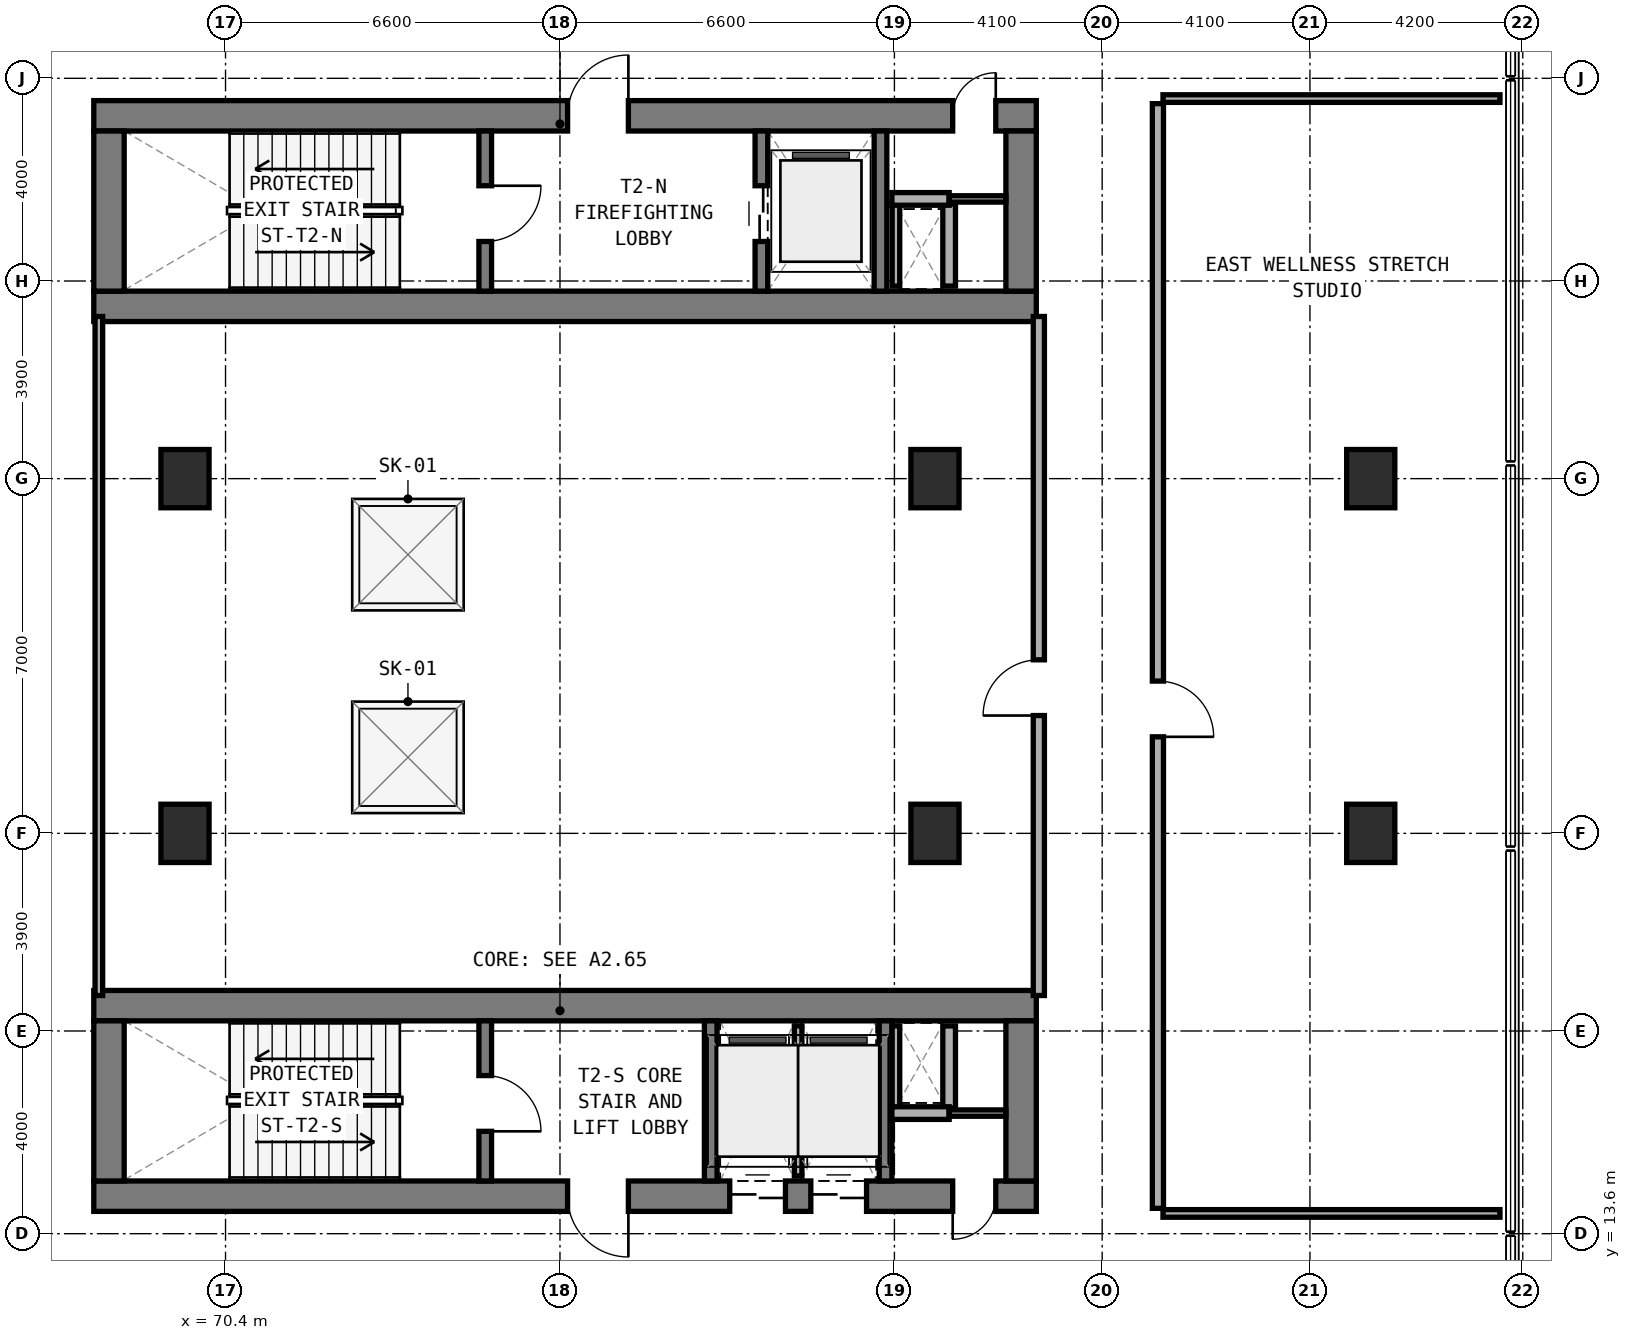
"""IFC4 building model, lengths in metres.
Left out: names, types, materials, properties, quantities, classifications, styles, units other than length and angle.
Written with IfcOpenShell. Run it as: python <this file> out.ifc"""

import sys

from ifc_helpers import new_model, si_unit, direction, frame, frame_2d, origin, origin_2d, place, context, subcontext, project, spatial, rectangle, extrude, element, fill, save


model = new_model("IFC4")
c1 = context("Model", 3, precision=1e-05, world=origin(), true_north=direction((0.0, 1.0)))
c2 = subcontext(c1, "Body", "Model", "MODEL_VIEW")
j1 = project(units=[si_unit("LENGTHUNIT", "METRE"), si_unit("PLANEANGLEUNIT", "RADIAN")], contexts=[c1])
p1 = place(None, origin())
s1 = spatial("IfcSite", under=j1, at=p1, CompositionType="ELEMENT")
p2 = place(p1, origin())
s2 = spatial("IfcBuilding", under=s1, at=p2, CompositionType="ELEMENT")
p3 = place(p2, frame((0.0, 0.0, 19.5)))
s3 = spatial("IfcBuildingStorey", under=s2, at=p3, CompositionType="ELEMENT", Elevation=19.5)
p4 = place(p3, frame((67.8, 31.9, 0.0), z_axis=(0.0, 0.0, 1.0), x_axis=(1.0, 0.0, 0.0)))
e1 = element("IfcWall", 1, at=p4, inside=s3, PredefinedType="SHEAR", context=c2, shape_type="SweptSolid", body=[
    extrude(rectangle(XDim=18.6, YDim=0.6, at=frame_2d((9.3, 0.0))), origin(), (0.0, 0.0, 1.0), 4.5),
])
p5 = place(p3, frame((67.8, 35.66, 0.0), z_axis=(0.0, 0.0, 1.0), x_axis=(1.0, 0.0, 0.0)))
e2 = element("IfcWall", 2, at=p5, inside=s3, PredefinedType="SHEAR", context=c2, shape_type="SweptSolid", body=[
    extrude(rectangle(XDim=18.6, YDim=0.6, at=frame_2d((9.3, 0.0))), origin(), (0.0, 0.0, 1.0), 4.5),
])
p6 = place(p5, frame((9.35, 0.0, 0.0)))
e3 = element("IfcOpeningElement", 3, at=p6, cuts=e2, PredefinedType="OPENING", context=c2, shape_type="SweptSolid", body=[
    extrude(rectangle(XDim=1.2, YDim=2.15, at=frame_2d((0.6, 1.075))), frame((0.0, 0.31, 0.0), z_axis=(0.0, -1.0, 0.0), x_axis=(1.0, 0.0, 0.0)), (0.0, 0.0, 1.0), 0.62),
])
p7 = place(p5, frame((16.95, 0.0, 0.0)))
e4 = element("IfcOpeningElement", 4, at=p7, cuts=e2, PredefinedType="OPENING", context=c2, shape_type="SweptSolid", body=[
    extrude(rectangle(XDim=0.85, YDim=2.1, at=frame_2d((0.425, 1.05))), frame((0.0, 0.31, 0.0), z_axis=(0.0, -1.0, 0.0), x_axis=(1.0, 0.0, 0.0)), (0.0, 0.0, 1.0), 0.62),
])
for number, where, z_axis, x_axis in (
    (5, (68.1, 32.2, 0.0), (0.0, 0.0, 1.0), (0.0, 1.0, 0.0)),
    (6, (86.1, 32.2, 0.0), (0.0, 0.0, 1.0), (0.0, 1.0, 0.0)),
):
    element("IfcWall", number, at=place(p3, frame(where, z_axis=z_axis, x_axis=x_axis)), inside=s3, PredefinedType="SHEAR", context=c2, shape_type="SweptSolid", body=[
        extrude(rectangle(XDim=3.16, YDim=0.6, at=frame_2d((1.58, 0.0))), origin(), (0.0, 0.0, 1.0), 4.5),
    ])
p8 = place(p3, frame((75.525, 32.2, 0.0), z_axis=(0.0, 0.0, 1.0), x_axis=(0.0, 1.0, 0.0)))
e7 = element("IfcWall", 7, at=p8, inside=s3, PredefinedType="STANDARD", context=c2, shape_type="SweptSolid", body=[
    extrude(rectangle(XDim=3.16, YDim=0.25, at=frame_2d((1.58, 0.0))), origin(), (0.0, 0.0, 1.0), 4.25),
])
p9 = place(p8, frame((0.98, 0.0, 0.0)))
e8 = element("IfcOpeningElement", 8, at=p9, cuts=e7, PredefinedType="OPENING", context=c2, shape_type="SweptSolid", body=[
    extrude(rectangle(XDim=1.1, YDim=2.15, at=frame_2d((0.55, 1.075))), frame((0.0, 0.135, 0.0), z_axis=(0.0, -1.0, 0.0), x_axis=(1.0, 0.0, 0.0)), (0.0, 0.0, 1.0), 0.27),
])
p10 = place(p3, frame((80.975, 32.2, 0.0), z_axis=(0.0, 0.0, 1.0), x_axis=(0.0, 1.0, 0.0)))
e9 = element("IfcWall", 9, at=p10, inside=s3, PredefinedType="STANDARD", context=c2, shape_type="SweptSolid", body=[
    extrude(rectangle(XDim=3.16, YDim=0.25, at=frame_2d((1.58, 0.0))), origin(), (0.0, 0.0, 1.0), 4.25),
])
p11 = place(p10, frame((0.98, 0.0, 0.0)))
e10 = element("IfcOpeningElement", 10, at=p11, cuts=e9, PredefinedType="OPENING", context=c2, shape_type="SweptSolid", body=[
    extrude(rectangle(XDim=1.1, YDim=2.15, at=frame_2d((0.55, 1.075))), frame((0.0, 0.135, 0.0), z_axis=(0.0, -1.0, 0.0), x_axis=(1.0, 0.0, 0.0)), (0.0, 0.0, 1.0), 0.27),
])
p12 = place(p3, frame((83.325, 32.2, 0.0), z_axis=(0.0, 0.0, 1.0), x_axis=(0.0, 1.0, 0.0)))
e11 = element("IfcWall", 11, at=p12, inside=s3, PredefinedType="STANDARD", context=c2, shape_type="SweptSolid", body=[
    extrude(rectangle(XDim=3.16, YDim=0.25, at=frame_2d((1.58, 0.0))), origin(), (0.0, 0.0, 1.0), 4.25),
])
p13 = place(p3, frame((67.8, 14.34, 0.0), z_axis=(0.0, 0.0, 1.0), x_axis=(1.0, 0.0, 0.0)))
e12 = element("IfcWall", 12, at=p13, inside=s3, PredefinedType="SHEAR", context=c2, shape_type="SweptSolid", body=[
    extrude(rectangle(XDim=18.6, YDim=0.6, at=frame_2d((9.3, 0.0))), origin(), (0.0, 0.0, 1.0), 4.5),
])
p14 = place(p13, frame((9.35, 0.0, 0.0)))
e13 = element("IfcOpeningElement", 13, at=p14, cuts=e12, PredefinedType="OPENING", context=c2, shape_type="SweptSolid", body=[
    extrude(rectangle(XDim=1.2, YDim=2.15, at=frame_2d((0.6, 1.075))), frame((0.0, 0.31, 0.0), z_axis=(0.0, -1.0, 0.0), x_axis=(1.0, 0.0, 0.0)), (0.0, 0.0, 1.0), 0.62),
])
p15 = place(p13, frame((16.95, 0.0, 0.0)))
e14 = element("IfcOpeningElement", 14, at=p15, cuts=e12, PredefinedType="OPENING", context=c2, shape_type="SweptSolid", body=[
    extrude(rectangle(XDim=0.85, YDim=2.1, at=frame_2d((0.425, 1.05))), frame((0.0, 0.31, 0.0), z_axis=(0.0, -1.0, 0.0), x_axis=(1.0, 0.0, 0.0)), (0.0, 0.0, 1.0), 0.62),
])
p16 = place(p13, frame((12.55, 0.0, 0.0)))
e15 = element("IfcOpeningElement", 15, at=p16, cuts=e12, PredefinedType="OPENING", context=c2, shape_type="SweptSolid", body=[
    extrude(rectangle(XDim=1.1, YDim=2.15, at=frame_2d((0.55, 1.075))), frame((0.0, 0.31, 0.0), z_axis=(0.0, -1.0, 0.0), x_axis=(1.0, 0.0, 0.0)), (0.0, 0.0, 1.0), 0.62),
])
p17 = place(p13, frame((14.15, 0.0, 0.0)))
e16 = element("IfcOpeningElement", 16, at=p17, cuts=e12, PredefinedType="OPENING", context=c2, shape_type="SweptSolid", body=[
    extrude(rectangle(XDim=1.1, YDim=2.15, at=frame_2d((0.55, 1.075))), frame((0.0, 0.31, 0.0), z_axis=(0.0, -1.0, 0.0), x_axis=(1.0, 0.0, 0.0)), (0.0, 0.0, 1.0), 0.62),
])
p18 = place(p3, frame((67.8, 18.1, 0.0), z_axis=(0.0, 0.0, 1.0), x_axis=(1.0, 0.0, 0.0)))
e17 = element("IfcWall", 17, at=p18, inside=s3, PredefinedType="SHEAR", context=c2, shape_type="SweptSolid", body=[
    extrude(rectangle(XDim=18.6, YDim=0.6, at=frame_2d((9.3, 0.0))), origin(), (0.0, 0.0, 1.0), 4.5),
])
for number, where, z_axis, x_axis in (
    (18, (68.1, 14.64, 0.0), (0.0, 0.0, 1.0), (0.0, 1.0, 0.0)),
    (19, (86.1, 14.64, 0.0), (0.0, 0.0, 1.0), (0.0, 1.0, 0.0)),
):
    element("IfcWall", number, at=place(p3, frame(where, z_axis=z_axis, x_axis=x_axis)), inside=s3, PredefinedType="SHEAR", context=c2, shape_type="SweptSolid", body=[
        extrude(rectangle(XDim=3.16, YDim=0.6, at=frame_2d((1.58, 0.0))), origin(), (0.0, 0.0, 1.0), 4.5),
    ])
p19 = place(p3, frame((75.525, 14.64, 0.0), z_axis=(0.0, 0.0, 1.0), x_axis=(0.0, 1.0, 0.0)))
e20 = element("IfcWall", 20, at=p19, inside=s3, PredefinedType="STANDARD", context=c2, shape_type="SweptSolid", body=[
    extrude(rectangle(XDim=3.16, YDim=0.25, at=frame_2d((1.58, 0.0))), origin(), (0.0, 0.0, 1.0), 4.25),
])
p20 = place(p19, frame((0.98, 0.0, 0.0)))
e21 = element("IfcOpeningElement", 21, at=p20, cuts=e20, PredefinedType="OPENING", context=c2, shape_type="SweptSolid", body=[
    extrude(rectangle(XDim=1.1, YDim=2.15, at=frame_2d((0.55, 1.075))), frame((0.0, 0.135, 0.0), z_axis=(0.0, -1.0, 0.0), x_axis=(1.0, 0.0, 0.0)), (0.0, 0.0, 1.0), 0.27),
])
for number, where, z_axis, x_axis in (
    (22, (79.975, 14.64, 0.0), (0.0, 0.0, 1.0), (0.0, 1.0, 0.0)),
    (23, (83.425, 14.64, 0.0), (0.0, 0.0, 1.0), (0.0, 1.0, 0.0)),
):
    element("IfcWall", number, at=place(p3, frame(where, z_axis=z_axis, x_axis=x_axis)), inside=s3, PredefinedType="STANDARD", context=c2, shape_type="SweptSolid", body=[
        extrude(rectangle(XDim=3.16, YDim=0.25, at=frame_2d((1.58, 0.0))), origin(), (0.0, 0.0, 1.0), 4.25),
    ])
for number, where, z_axis, x_axis in (
    (24, (93.0, 21.5, 0.0), (0.0, 0.0, 1.0), (1.0, 0.0, 0.0)),
    (25, (93.0, 28.5, 0.0), (0.0, 0.0, 1.0), (1.0, 0.0, 0.0)),
    (26, (69.6, 21.5, 0.0), (0.0, 0.0, 1.0), (1.0, 0.0, 0.0)),
    (27, (69.6, 28.5, 0.0), (0.0, 0.0, 1.0), (1.0, 0.0, 0.0)),
    (28, (84.4, 21.5, 0.0), (0.0, 0.0, 1.0), (1.0, 0.0, 0.0)),
    (29, (84.4, 28.5, 0.0), (0.0, 0.0, 1.0), (1.0, 0.0, 0.0)),
):
    element("IfcColumn", number, at=place(p3, frame(where, z_axis=z_axis, x_axis=x_axis)), inside=s3, PredefinedType="COLUMN", context=c2, shape_type="SweptSolid", body=[
        extrude(rectangle(XDim=0.95, YDim=1.15, at=origin_2d()), origin(), (0.0, 0.0, 1.0), 4.5),
    ])
p21 = place(p3, frame((83.63, 32.3, 0.0), z_axis=(0.0, 0.0, 1.0), x_axis=(0.0, 1.0, 0.0)))
e30 = element("IfcWall", 30, at=p21, inside=s3, PredefinedType="PARTITIONING", context=c2, shape_type="SweptSolid", body=[
    extrude(rectangle(XDim=1.62, YDim=0.15, at=frame_2d((0.81, 0.0))), origin(), (0.0, 0.0, 1.0), 3.725),
])
p22 = place(p3, frame((84.68, 32.3, 0.0), z_axis=(0.0, 0.0, 1.0), x_axis=(0.0, 1.0, 0.0)))
e31 = element("IfcWall", 31, at=p22, inside=s3, PredefinedType="SOLIDWALL", context=c2, shape_type="SweptSolid", body=[
    extrude(rectangle(XDim=1.62, YDim=0.25, at=frame_2d((0.81, 0.0))), origin(), (0.0, 0.0, 1.0), 4.22),
])
p23 = place(p3, frame((83.55, 34.02, 0.0), z_axis=(0.0, 0.0, 1.0), x_axis=(1.0, 0.0, 0.0)))
e32 = element("IfcWall", 32, at=p23, inside=s3, PredefinedType="SOLIDWALL", context=c2, shape_type="SweptSolid", body=[
    extrude(rectangle(XDim=1.13, YDim=0.25, at=frame_2d((0.565, 0.0))), origin(), (0.0, 0.0, 1.0), 4.22),
])
p24 = place(p3, frame((84.68, 34.02, 0.0), z_axis=(0.0, 0.0, 1.0), x_axis=(1.0, 0.0, 0.0)))
e33 = element("IfcWall", 33, at=p24, inside=s3, PredefinedType="PARTITIONING", context=c2, shape_type="SweptSolid", body=[
    extrude(rectangle(XDim=1.12, YDim=0.125, at=frame_2d((0.56, 0.0))), origin(), (0.0, 0.0, 1.0), 4.22),
])
p25 = place(p3, frame((83.63, 16.08, 0.0), z_axis=(0.0, 0.0, 1.0), x_axis=(0.0, 1.0, 0.0)))
e34 = element("IfcWall", 34, at=p25, inside=s3, PredefinedType="PARTITIONING", context=c2, shape_type="SweptSolid", body=[
    extrude(rectangle(XDim=1.62, YDim=0.15, at=frame_2d((0.81, 0.0))), origin(), (0.0, 0.0, 1.0), 3.725),
])
p26 = place(p3, frame((84.68, 16.08, 0.0), z_axis=(0.0, 0.0, 1.0), x_axis=(0.0, 1.0, 0.0)))
e35 = element("IfcWall", 35, at=p26, inside=s3, PredefinedType="SOLIDWALL", context=c2, shape_type="SweptSolid", body=[
    extrude(rectangle(XDim=1.62, YDim=0.25, at=frame_2d((0.81, 0.0))), origin(), (0.0, 0.0, 1.0), 4.22),
])
p27 = place(p3, frame((83.55, 15.98, 0.0), z_axis=(0.0, 0.0, 1.0), x_axis=(1.0, 0.0, 0.0)))
e36 = element("IfcWall", 36, at=p27, inside=s3, PredefinedType="SOLIDWALL", context=c2, shape_type="SweptSolid", body=[
    extrude(rectangle(XDim=1.13, YDim=0.25, at=frame_2d((0.565, 0.0))), origin(), (0.0, 0.0, 1.0), 4.22),
])
p28 = place(p3, frame((84.68, 15.98, 0.0), z_axis=(0.0, 0.0, 1.0), x_axis=(1.0, 0.0, 0.0)))
e37 = element("IfcWall", 37, at=p28, inside=s3, PredefinedType="PARTITIONING", context=c2, shape_type="SweptSolid", body=[
    extrude(rectangle(XDim=1.12, YDim=0.125, at=frame_2d((0.56, 0.0))), origin(), (0.0, 0.0, 1.0), 4.22),
])
p29 = place(p3, frame((81.7, 14.74, 0.0), z_axis=(0.0, 0.0, 1.0), x_axis=(0.0, 1.0, 0.0)))
e38 = element("IfcWall", 38, at=p29, inside=s3, PredefinedType="PARTITIONING", context=c2, shape_type="SweptSolid", body=[
    extrude(rectangle(XDim=2.96, YDim=0.15, at=frame_2d((1.48, 0.0))), origin(), (0.0, 0.0, 1.0), 4.22),
])
p30 = place(p3, frame((67.9, 18.3, 0.0), z_axis=(0.0, 0.0, 1.0), x_axis=(0.0, 1.0, 0.0)))
e39 = element("IfcWall", 39, at=p30, inside=s3, PredefinedType="PARTITIONING", context=c2, shape_type="SweptSolid", body=[
    extrude(rectangle(XDim=13.4, YDim=0.15, at=frame_2d((6.7, 0.0))), origin(), (0.0, 0.0, 1.0), 3.725),
])
p31 = place(p3, frame((86.45, 18.3, 0.0), z_axis=(0.0, 0.0, 1.0), x_axis=(0.0, 1.0, 0.0)))
e40 = element("IfcWall", 40, at=p31, inside=s3, PredefinedType="SOLIDWALL", context=c2, shape_type="SweptSolid", body=[
    extrude(rectangle(XDim=13.4, YDim=0.22, at=frame_2d((6.7, 0.0))), origin(), (0.0, 0.0, 1.0), 3.725),
])
p32 = place(p31, frame((5.525, 0.0, 0.0)))
e41 = element("IfcOpeningElement", 41, at=p32, cuts=e40, PredefinedType="OPENING", context=c2, shape_type="SweptSolid", body=[
    extrude(rectangle(XDim=1.1, YDim=2.1, at=frame_2d((0.55, 1.05))), frame((0.0, 0.12, 0.0), z_axis=(0.0, -1.0, 0.0), x_axis=(1.0, 0.0, 0.0)), (0.0, 0.0, 1.0), 0.24),
])
for number, where, z_axis, x_axis in (
    (42, (88.9, 14.0, 0.0), (0.0, 0.0, 1.0), (1.0, 0.0, 0.0)),
    (43, (88.9, 36.0, 0.0), (0.0, 0.0, 1.0), (1.0, 0.0, 0.0)),
):
    element("IfcWall", number, at=place(p3, frame(where, z_axis=z_axis, x_axis=x_axis)), inside=s3, PredefinedType="PARTITIONING", context=c2, shape_type="SweptSolid", body=[
        extrude(rectangle(XDim=6.65, YDim=0.15, at=frame_2d((3.325, 0.0))), origin(), (0.0, 0.0, 1.0), 3.865),
    ])
p33 = place(p3, frame((88.8, 14.1, 0.0), z_axis=(0.0, 0.0, 1.0), x_axis=(0.0, 1.0, 0.0)))
e44 = element("IfcWall", 44, at=p33, inside=s3, PredefinedType="SOLIDWALL", context=c2, shape_type="SweptSolid", body=[
    extrude(rectangle(XDim=21.8, YDim=0.22, at=frame_2d((10.9, 0.0))), origin(), (0.0, 0.0, 1.0), 3.725),
])
p34 = place(p33, frame((9.305, 0.0, 0.0)))
e45 = element("IfcOpeningElement", 45, at=p34, cuts=e44, PredefinedType="OPENING", context=c2, shape_type="SweptSolid", body=[
    extrude(rectangle(XDim=1.1, YDim=2.1, at=frame_2d((0.55, 1.05))), frame((0.0, 0.12, 0.0), z_axis=(0.0, -1.0, 0.0), x_axis=(1.0, 0.0, 0.0)), (0.0, 0.0, 1.0), 0.24),
])
p35 = place(p3, frame((0.0, 0.0, -0.4)))
p36 = place(p35, frame((74.0, 23.0, 0.0)))
p37 = place(p36, frame((0.0, 0.0, 0.35)))
e46 = element("IfcWindow", 46, at=p37, inside=s3, PartitioningType="SINGLE_PANEL", PredefinedType="SKYLIGHT", context=c2, shape_type="SweptSolid", body=[
    extrude(rectangle(XDim=2.2, YDim=2.2, at=origin_2d()), origin(), (0.0, 0.0, 1.0), 0.05),
])
p38 = place(p35, frame((74.0, 27.0, 0.0)))
p39 = place(p38, frame((0.0, 0.0, 0.35)))
e47 = element("IfcWindow", 47, at=p39, inside=s3, PartitioningType="SINGLE_PANEL", PredefinedType="SKYLIGHT", context=c2, shape_type="SweptSolid", body=[
    extrude(rectangle(XDim=2.2, YDim=2.2, at=origin_2d()), origin(), (0.0, 0.0, 1.0), 0.05),
])
p40 = place(p9, frame((1.1, 0.0, 0.0), z_axis=(0.0, 0.0, 1.0), x_axis=(-1.0, 0.0, 0.0)))
e48 = element("IfcDoor", 48, at=p40, inside=s3, OperationType="SINGLE_SWING_LEFT", PredefinedType="DOOR", context=c2, shape_type="SweptSolid", body=[
    extrude(rectangle(XDim=1.1, YDim=2.15, at=frame_2d((0.55, 1.075))), frame((0.0, 0.025, 0.0), z_axis=(0.0, -1.0, 0.0), x_axis=(1.0, 0.0, 0.0)), (0.0, 0.0, 1.0), 0.05),
])
fill(e8, e48)
p41 = place(p6, origin())
e49 = element("IfcDoor", 49, at=p41, inside=s3, OperationType="SINGLE_SWING_RIGHT", PredefinedType="DOOR", context=c2, shape_type="SweptSolid", body=[
    extrude(rectangle(XDim=1.2, YDim=2.15, at=frame_2d((0.6, 1.075))), frame((0.0, 0.025, 0.0), z_axis=(0.0, -1.0, 0.0), x_axis=(1.0, 0.0, 0.0)), (0.0, 0.0, 1.0), 0.05),
])
fill(e3, e49)
p42 = place(p11, origin())
e50 = element("IfcDoor", 50, at=p42, inside=s3, OperationType="DOUBLE_DOOR_SLIDING", PredefinedType="DOOR", context=c2, shape_type="SweptSolid", body=[
    extrude(rectangle(XDim=1.1, YDim=2.15, at=frame_2d((0.55, 1.075))), frame((0.0, 0.025, 0.0), z_axis=(0.0, -1.0, 0.0), x_axis=(1.0, 0.0, 0.0)), (0.0, 0.0, 1.0), 0.05),
])
fill(e10, e50)
p43 = place(p7, origin())
e51 = element("IfcDoor", 51, at=p43, inside=s3, OperationType="SINGLE_SWING_RIGHT", PredefinedType="DOOR", context=c2, shape_type="SweptSolid", body=[
    extrude(rectangle(XDim=0.85, YDim=2.1, at=frame_2d((0.425, 1.05))), frame((0.0, 0.025, 0.0), z_axis=(0.0, -1.0, 0.0), x_axis=(1.0, 0.0, 0.0)), (0.0, 0.0, 1.0), 0.05),
])
fill(e4, e51)
p44 = place(p20, frame((1.1, 0.0, 0.0), z_axis=(0.0, 0.0, 1.0), x_axis=(-1.0, 0.0, 0.0)))
e52 = element("IfcDoor", 52, at=p44, inside=s3, OperationType="SINGLE_SWING_RIGHT", PredefinedType="DOOR", context=c2, shape_type="SweptSolid", body=[
    extrude(rectangle(XDim=1.1, YDim=2.15, at=frame_2d((0.55, 1.075))), frame((0.0, 0.025, 0.0), z_axis=(0.0, -1.0, 0.0), x_axis=(1.0, 0.0, 0.0)), (0.0, 0.0, 1.0), 0.05),
])
fill(e21, e52)
p45 = place(p14, frame((1.2, 0.0, 0.0), z_axis=(0.0, 0.0, 1.0), x_axis=(-1.0, 0.0, 0.0)))
e53 = element("IfcDoor", 53, at=p45, inside=s3, OperationType="SINGLE_SWING_LEFT", PredefinedType="DOOR", context=c2, shape_type="SweptSolid", body=[
    extrude(rectangle(XDim=1.2, YDim=2.15, at=frame_2d((0.6, 1.075))), frame((0.0, 0.025, 0.0), z_axis=(0.0, -1.0, 0.0), x_axis=(1.0, 0.0, 0.0)), (0.0, 0.0, 1.0), 0.05),
])
fill(e13, e53)
p46 = place(p15, frame((0.85, 0.0, 0.0), z_axis=(0.0, 0.0, 1.0), x_axis=(-1.0, 0.0, 0.0)))
e54 = element("IfcDoor", 54, at=p46, inside=s3, OperationType="SINGLE_SWING_RIGHT", PredefinedType="DOOR", context=c2, shape_type="SweptSolid", body=[
    extrude(rectangle(XDim=0.85, YDim=2.1, at=frame_2d((0.425, 1.05))), frame((0.0, 0.025, 0.0), z_axis=(0.0, -1.0, 0.0), x_axis=(1.0, 0.0, 0.0)), (0.0, 0.0, 1.0), 0.05),
])
fill(e14, e54)
p47 = place(p16, frame((1.1, 0.0, 0.0), z_axis=(0.0, 0.0, 1.0), x_axis=(-1.0, 0.0, 0.0)))
e55 = element("IfcDoor", 55, at=p47, inside=s3, OperationType="DOUBLE_DOOR_SLIDING", PredefinedType="DOOR", context=c2, shape_type="SweptSolid", body=[
    extrude(rectangle(XDim=1.1, YDim=2.15, at=frame_2d((0.55, 1.075))), frame((0.0, 0.025, 0.0), z_axis=(0.0, -1.0, 0.0), x_axis=(1.0, 0.0, 0.0)), (0.0, 0.0, 1.0), 0.05),
])
fill(e15, e55)
p48 = place(p17, frame((1.1, 0.0, 0.0), z_axis=(0.0, 0.0, 1.0), x_axis=(-1.0, 0.0, 0.0)))
e56 = element("IfcDoor", 56, at=p48, inside=s3, OperationType="DOUBLE_DOOR_SLIDING", PredefinedType="DOOR", context=c2, shape_type="SweptSolid", body=[
    extrude(rectangle(XDim=1.1, YDim=2.15, at=frame_2d((0.55, 1.075))), frame((0.0, 0.025, 0.0), z_axis=(0.0, -1.0, 0.0), x_axis=(1.0, 0.0, 0.0)), (0.0, 0.0, 1.0), 0.05),
])
fill(e16, e56)
p49 = place(p32, origin())
e57 = element("IfcDoor", 57, at=p49, inside=s3, OperationType="SINGLE_SWING_LEFT", PredefinedType="DOOR", context=c2, shape_type="SweptSolid", body=[
    extrude(rectangle(XDim=1.1, YDim=2.1, at=frame_2d((0.55, 1.05))), frame((0.0, 0.025, 0.0), z_axis=(0.0, -1.0, 0.0), x_axis=(1.0, 0.0, 0.0)), (0.0, 0.0, 1.0), 0.05),
])
fill(e41, e57)
p50 = place(p34, frame((1.1, 0.0, 0.0), z_axis=(0.0, 0.0, 1.0), x_axis=(-1.0, 0.0, 0.0)))
e58 = element("IfcDoor", 58, at=p50, inside=s3, OperationType="SINGLE_SWING_RIGHT", PredefinedType="DOOR", context=c2, shape_type="SweptSolid", body=[
    extrude(rectangle(XDim=1.1, YDim=2.1, at=frame_2d((0.55, 1.05))), frame((0.0, 0.025, 0.0), z_axis=(0.0, -1.0, 0.0), x_axis=(1.0, 0.0, 0.0)), (0.0, 0.0, 1.0), 0.05),
])
fill(e45, e58)
save(model, sys.argv[1])
